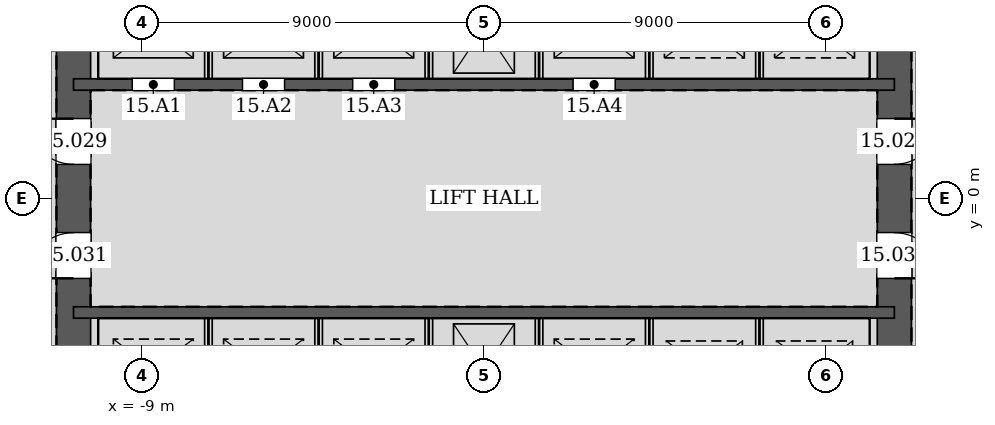
"""IFC4 building model, lengths in metres.
Left out: names, types, materials, properties, quantities, classifications, styles, units other than length and angle.
Written with IfcOpenShell. Run it as: python <this file> out.ifc"""

import sys

from ifc_helpers import new_model, si_unit, direction, frame, frame_2d, origin, place, context, subcontext, project, spatial, rectangle, extrude, element, fill, save


model = new_model("IFC4")
c1 = context("Model", 3, precision=1e-05, world=origin(), true_north=direction((0.0, 1.0)))
c2 = subcontext(c1, "Body", "Model", "MODEL_VIEW")
j1 = project(units=[si_unit("LENGTHUNIT", "METRE"), si_unit("PLANEANGLEUNIT", "RADIAN")], contexts=[c1])
p1 = place(None, origin())
s1 = spatial("IfcSite", under=j1, at=p1, CompositionType="ELEMENT")
p2 = place(p1, origin())
s2 = spatial("IfcBuilding", under=s1, at=p2, CompositionType="ELEMENT")
p3 = place(p2, frame((0.0, 0.0, 70.8)))
s3 = spatial("IfcBuildingStorey", under=s2, at=p3, CompositionType="ELEMENT", Elevation=70.8)
p4 = place(p3, frame((10.8, -10.8, 0.0), z_axis=(0.0, 0.0, 1.0), x_axis=(0.0, 1.0, 0.0)))
e1 = element("IfcWall", 1, at=p4, inside=s3, PredefinedType="SOLIDWALL", context=c2, shape_type="SweptSolid", body=[
    extrude(rectangle(XDim=21.6, YDim=0.9, at=frame_2d((10.8, 0.0))), origin(), (0.0, 0.0, 1.0), 4.2),
])
p5 = place(p4, frame((11.7, 0.0, 0.0)))
e2 = element("IfcOpeningElement", 2, at=p5, cuts=e1, PredefinedType="OPENING", context=c2, shape_type="SweptSolid", body=[
    extrude(rectangle(XDim=1.2, YDim=2.1, at=frame_2d((0.6, 1.05))), frame((0.0, 0.46, 0.0), z_axis=(0.0, -1.0, 0.0), x_axis=(1.0, 0.0, 0.0)), (0.0, 0.0, 1.0), 0.92),
])
p6 = place(p4, frame((8.7, 0.0, 0.0)))
e3 = element("IfcOpeningElement", 3, at=p6, cuts=e1, PredefinedType="OPENING", context=c2, shape_type="SweptSolid", body=[
    extrude(rectangle(XDim=1.2, YDim=2.1, at=frame_2d((0.6, 1.05))), frame((0.0, 0.46, 0.0), z_axis=(0.0, -1.0, 0.0), x_axis=(1.0, 0.0, 0.0)), (0.0, 0.0, 1.0), 0.92),
])
p7 = place(p3, frame((-10.8, 10.8, 0.0), z_axis=(0.0, 0.0, 1.0), x_axis=(0.0, -1.0, 0.0)))
e4 = element("IfcWall", 4, at=p7, inside=s3, PredefinedType="SOLIDWALL", context=c2, shape_type="SweptSolid", body=[
    extrude(rectangle(XDim=21.6, YDim=0.9, at=frame_2d((10.8, 0.0))), origin(), (0.0, 0.0, 1.0), 4.2),
])
p8 = place(p7, frame((8.7, 0.0, 0.0)))
e5 = element("IfcOpeningElement", 5, at=p8, cuts=e4, PredefinedType="OPENING", context=c2, shape_type="SweptSolid", body=[
    extrude(rectangle(XDim=1.2, YDim=2.1, at=frame_2d((0.6, 1.05))), frame((0.0, 0.46, 0.0), z_axis=(0.0, -1.0, 0.0), x_axis=(1.0, 0.0, 0.0)), (0.0, 0.0, 1.0), 0.92),
])
p9 = place(p7, frame((11.7, 0.0, 0.0)))
e6 = element("IfcOpeningElement", 6, at=p9, cuts=e4, PredefinedType="OPENING", context=c2, shape_type="SweptSolid", body=[
    extrude(rectangle(XDim=1.2, YDim=2.1, at=frame_2d((0.6, 1.05))), frame((0.0, 0.46, 0.0), z_axis=(0.0, -1.0, 0.0), x_axis=(1.0, 0.0, 0.0)), (0.0, 0.0, 1.0), 0.92),
])
p10 = place(p3, frame((-10.8, 3.0, 0.0), z_axis=(0.0, 0.0, 1.0), x_axis=(1.0, 0.0, 0.0)))
e7 = element("IfcWall", 7, at=p10, inside=s3, PredefinedType="SOLIDWALL", context=c2, shape_type="SweptSolid", body=[
    extrude(rectangle(XDim=21.6, YDim=0.3, at=frame_2d((10.8, 0.0))), origin(), (0.0, 0.0, 1.0), 4.2),
])
p11 = place(p10, frame((1.55, 0.0, 0.0)))
e8 = element("IfcOpeningElement", 8, at=p11, cuts=e7, PredefinedType="OPENING", context=c2, shape_type="SweptSolid", body=[
    extrude(rectangle(XDim=1.1, YDim=2.1, at=frame_2d((0.55, 1.05))), frame((0.0, 0.16, 0.0), z_axis=(0.0, -1.0, 0.0), x_axis=(1.0, 0.0, 0.0)), (0.0, 0.0, 1.0), 0.32),
])
p12 = place(p10, frame((4.45, 0.0, 0.0)))
e9 = element("IfcOpeningElement", 9, at=p12, cuts=e7, PredefinedType="OPENING", context=c2, shape_type="SweptSolid", body=[
    extrude(rectangle(XDim=1.1, YDim=2.1, at=frame_2d((0.55, 1.05))), frame((0.0, 0.16, 0.0), z_axis=(0.0, -1.0, 0.0), x_axis=(1.0, 0.0, 0.0)), (0.0, 0.0, 1.0), 0.32),
])
p13 = place(p10, frame((7.35, 0.0, 0.0)))
e10 = element("IfcOpeningElement", 10, at=p13, cuts=e7, PredefinedType="OPENING", context=c2, shape_type="SweptSolid", body=[
    extrude(rectangle(XDim=1.1, YDim=2.1, at=frame_2d((0.55, 1.05))), frame((0.0, 0.16, 0.0), z_axis=(0.0, -1.0, 0.0), x_axis=(1.0, 0.0, 0.0)), (0.0, 0.0, 1.0), 0.32),
])
p14 = place(p10, frame((13.15, 0.0, 0.0)))
e11 = element("IfcOpeningElement", 11, at=p14, cuts=e7, PredefinedType="OPENING", context=c2, shape_type="SweptSolid", body=[
    extrude(rectangle(XDim=1.1, YDim=2.1, at=frame_2d((0.55, 1.05))), frame((0.0, 0.16, 0.0), z_axis=(0.0, -1.0, 0.0), x_axis=(1.0, 0.0, 0.0)), (0.0, 0.0, 1.0), 0.32),
])
p15 = place(p3, frame((-10.8, -3.0, 0.0), z_axis=(0.0, 0.0, 1.0), x_axis=(1.0, 0.0, 0.0)))
e12 = element("IfcWall", 12, at=p15, inside=s3, PredefinedType="SOLIDWALL", context=c2, shape_type="SweptSolid", body=[
    extrude(rectangle(XDim=21.6, YDim=0.3, at=frame_2d((10.8, 0.0))), origin(), (0.0, 0.0, 1.0), 4.2),
])
for number, where, z_axis, x_axis in (
    (13, (-7.25, 3.15, 0.0), (0.0, 0.0, 1.0), (0.0, 1.0, 0.0)),
    (14, (-4.35, 3.15, 0.0), (0.0, 0.0, 1.0), (0.0, 1.0, 0.0)),
    (15, (-1.45, 3.15, 0.0), (0.0, 0.0, 1.0), (0.0, 1.0, 0.0)),
    (16, (1.45, 3.15, 0.0), (0.0, 0.0, 1.0), (0.0, 1.0, 0.0)),
    (17, (4.35, 3.15, 0.0), (0.0, 0.0, 1.0), (0.0, 1.0, 0.0)),
    (18, (7.25, 3.15, 0.0), (0.0, 0.0, 1.0), (0.0, 1.0, 0.0)),
    (19, (-7.25, -5.85, 0.0), (0.0, 0.0, 1.0), (0.0, 1.0, 0.0)),
    (20, (-4.35, -5.85, 0.0), (0.0, 0.0, 1.0), (0.0, 1.0, 0.0)),
    (21, (-1.45, -5.85, 0.0), (0.0, 0.0, 1.0), (0.0, 1.0, 0.0)),
    (22, (1.45, -5.85, 0.0), (0.0, 0.0, 1.0), (0.0, 1.0, 0.0)),
    (23, (4.35, -5.85, 0.0), (0.0, 0.0, 1.0), (0.0, 1.0, 0.0)),
    (24, (7.25, -5.85, 0.0), (0.0, 0.0, 1.0), (0.0, 1.0, 0.0)),
):
    element("IfcWall", number, at=place(p3, frame(where, z_axis=z_axis, x_axis=x_axis)), inside=s3, PredefinedType="PARTITIONING", context=c2, shape_type="SweptSolid", body=[
        extrude(rectangle(XDim=2.7, YDim=0.2, at=frame_2d((1.35, 0.0))), origin(), (0.0, 0.0, 1.0), 4.2),
    ])
p16 = place(p5, frame((1.2, 0.0, 0.0), z_axis=(0.0, 0.0, 1.0), x_axis=(-1.0, 0.0, 0.0)))
e25 = element("IfcDoor", 25, at=p16, inside=s3, OperationType="SINGLE_SWING_LEFT", PredefinedType="DOOR", context=c2, shape_type="SweptSolid", body=[
    extrude(rectangle(XDim=1.2, YDim=2.1, at=frame_2d((0.6, 1.05))), frame((0.0, 0.025, 0.0), z_axis=(0.0, -1.0, 0.0), x_axis=(1.0, 0.0, 0.0)), (0.0, 0.0, 1.0), 0.05),
])
fill(e2, e25)
p17 = place(p8, frame((1.2, 0.0, 0.0), z_axis=(0.0, 0.0, 1.0), x_axis=(-1.0, 0.0, 0.0)))
e26 = element("IfcDoor", 26, at=p17, inside=s3, OperationType="SINGLE_SWING_RIGHT", PredefinedType="DOOR", context=c2, shape_type="SweptSolid", body=[
    extrude(rectangle(XDim=1.2, YDim=2.1, at=frame_2d((0.6, 1.05))), frame((0.0, 0.025, 0.0), z_axis=(0.0, -1.0, 0.0), x_axis=(1.0, 0.0, 0.0)), (0.0, 0.0, 1.0), 0.05),
])
fill(e5, e26)
p18 = place(p6, frame((1.2, 0.0, 0.0), z_axis=(0.0, 0.0, 1.0), x_axis=(-1.0, 0.0, 0.0)))
e27 = element("IfcDoor", 27, at=p18, inside=s3, OperationType="SINGLE_SWING_RIGHT", PredefinedType="DOOR", context=c2, shape_type="SweptSolid", body=[
    extrude(rectangle(XDim=1.2, YDim=2.1, at=frame_2d((0.6, 1.05))), frame((0.0, 0.025, 0.0), z_axis=(0.0, -1.0, 0.0), x_axis=(1.0, 0.0, 0.0)), (0.0, 0.0, 1.0), 0.05),
])
fill(e3, e27)
p19 = place(p9, frame((1.2, 0.0, 0.0), z_axis=(0.0, 0.0, 1.0), x_axis=(-1.0, 0.0, 0.0)))
e28 = element("IfcDoor", 28, at=p19, inside=s3, OperationType="SINGLE_SWING_LEFT", PredefinedType="DOOR", context=c2, shape_type="SweptSolid", body=[
    extrude(rectangle(XDim=1.2, YDim=2.1, at=frame_2d((0.6, 1.05))), frame((0.0, 0.025, 0.0), z_axis=(0.0, -1.0, 0.0), x_axis=(1.0, 0.0, 0.0)), (0.0, 0.0, 1.0), 0.05),
])
fill(e6, e28)
p20 = place(p11, origin())
e29 = element("IfcDoor", 29, at=p20, inside=s3, OperationType="DOUBLE_DOOR_SLIDING", PredefinedType="DOOR", context=c2, shape_type="SweptSolid", body=[
    extrude(rectangle(XDim=1.1, YDim=2.1, at=frame_2d((0.55, 1.05))), frame((0.0, 0.025, 0.0), z_axis=(0.0, -1.0, 0.0), x_axis=(1.0, 0.0, 0.0)), (0.0, 0.0, 1.0), 0.05),
])
fill(e8, e29)
p21 = place(p12, origin())
e30 = element("IfcDoor", 30, at=p21, inside=s3, OperationType="DOUBLE_DOOR_SLIDING", PredefinedType="DOOR", context=c2, shape_type="SweptSolid", body=[
    extrude(rectangle(XDim=1.1, YDim=2.1, at=frame_2d((0.55, 1.05))), frame((0.0, 0.025, 0.0), z_axis=(0.0, -1.0, 0.0), x_axis=(1.0, 0.0, 0.0)), (0.0, 0.0, 1.0), 0.05),
])
fill(e9, e30)
p22 = place(p13, origin())
e31 = element("IfcDoor", 31, at=p22, inside=s3, OperationType="DOUBLE_DOOR_SLIDING", PredefinedType="DOOR", context=c2, shape_type="SweptSolid", body=[
    extrude(rectangle(XDim=1.1, YDim=2.1, at=frame_2d((0.55, 1.05))), frame((0.0, 0.025, 0.0), z_axis=(0.0, -1.0, 0.0), x_axis=(1.0, 0.0, 0.0)), (0.0, 0.0, 1.0), 0.05),
])
fill(e10, e31)
p23 = place(p14, origin())
e32 = element("IfcDoor", 32, at=p23, inside=s3, OperationType="DOUBLE_DOOR_SLIDING", PredefinedType="DOOR", context=c2, shape_type="SweptSolid", body=[
    extrude(rectangle(XDim=1.1, YDim=2.1, at=frame_2d((0.55, 1.05))), frame((0.0, 0.025, 0.0), z_axis=(0.0, -1.0, 0.0), x_axis=(1.0, 0.0, 0.0)), (0.0, 0.0, 1.0), 0.05),
])
fill(e11, e32)
save(model, sys.argv[1])
